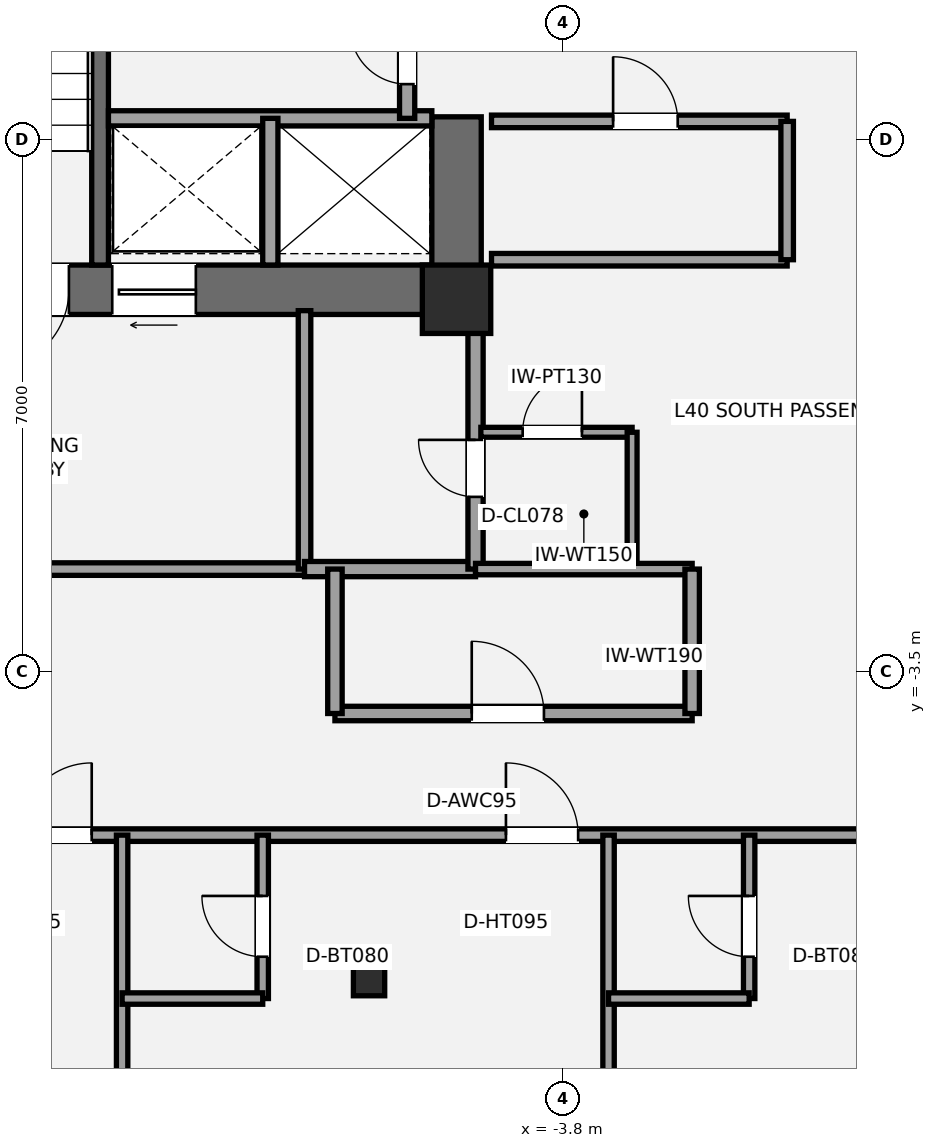
"""IFC4 building model, lengths in metres.
Left out: names, types, materials, properties, quantities, classifications, styles, units other than length and angle.
Written with IfcOpenShell. Run it as: python <this file> out.ifc"""

import sys

from ifc_helpers import new_model, si_unit, direction, frame, frame_2d, origin, origin_2d, place, context, subcontext, project, spatial, rectangle, i_section, extrude, element, fill, save


model = new_model("IFC4")
c1 = context("Model", 3, precision=1e-05, world=origin(), true_north=direction((0.0, 1.0)))
c2 = subcontext(c1, "Body", "Model", "MODEL_VIEW")
j1 = project(units=[si_unit("LENGTHUNIT", "METRE"), si_unit("PLANEANGLEUNIT", "RADIAN")], contexts=[c1])
p1 = place(None, origin())
s1 = spatial("IfcSite", under=j1, at=p1, CompositionType="ELEMENT")
p2 = place(p1, origin())
s2 = spatial("IfcBuilding", under=s1, at=p2, CompositionType="ELEMENT")
p3 = place(p2, frame((0.0, 0.0, 150.2)))
s3 = spatial("IfcBuildingStorey", under=s2, at=p3, CompositionType="ELEMENT", Elevation=150.2)
p4 = place(p3, frame((-4.875, 1.525, 0.0), z_axis=(0.0, 0.0, 1.0), x_axis=(-1.0, 0.0, 0.0)))
e1 = element("IfcWall", 1, at=p4, inside=s3, PredefinedType="SHEAR", context=c2, shape_type="SweptSolid", body=[
    extrude(rectangle(XDim=8.925, YDim=0.65, at=frame_2d((4.462, 0.0))), origin(), (0.0, 0.0, 1.0), 3.2),
])
p5 = place(p4, frame((5.425, 0.0, 0.0)))
e2 = element("IfcOpeningElement", 2, at=p5, cuts=e1, PredefinedType="OPENING", context=c2, shape_type="SweptSolid", body=[
    extrude(rectangle(XDim=1.05, YDim=2.15, at=frame_2d((0.525, 1.075))), frame((0.0, 0.335, 0.0), z_axis=(0.0, -1.0, 0.0), x_axis=(1.0, 0.0, 0.0)), (0.0, 0.0, 1.0), 0.67),
])
p6 = place(p4, frame((3.755, 0.0, 0.0)))
e3 = element("IfcOpeningElement", 3, at=p6, cuts=e1, PredefinedType="OPENING", context=c2, shape_type="SweptSolid", body=[
    extrude(rectangle(XDim=1.1, YDim=2.2, at=frame_2d((0.55, 1.1))), frame((0.0, 0.335, 0.0), z_axis=(0.0, -1.0, 0.0), x_axis=(1.0, 0.0, 0.0)), (0.0, 0.0, 1.0), 0.67),
])
p7 = place(p3, frame((-5.2, 1.2, 0.0), z_axis=(0.0, 0.0, 1.0), x_axis=(0.0, 1.0, 0.0)))
e4 = element("IfcWall", 4, at=p7, inside=s3, PredefinedType="SHEAR", context=c2, shape_type="SweptSolid", body=[
    extrude(rectangle(XDim=2.6, YDim=0.65, at=frame_2d((1.3, 0.0))), origin(), (0.0, 0.0, 1.0), 3.2),
])
p8 = place(p3, frame((-9.89, 1.85, 0.0), z_axis=(0.0, 0.0, 1.0), x_axis=(0.0, 1.0, 0.0)))
e5 = element("IfcWall", 5, at=p8, inside=s3, PredefinedType="SHEAR", context=c2, shape_type="SweptSolid", body=[
    extrude(rectangle(XDim=7.15, YDim=0.22, at=frame_2d((3.575, 0.0))), origin(), (0.0, 0.0, 1.0), 3.2),
])
p9 = place(p3, frame((-5.2, 1.4, 0.0), z_axis=(0.0, 0.0, 1.0), x_axis=(1.0, 0.0, 0.0)))
e6 = element("IfcColumn", 6, at=p9, inside=s3, PredefinedType="COLUMN", context=c2, shape_type="SweptSolid", body=[
    extrude(rectangle(XDim=0.9, YDim=0.9, at=origin_2d()), origin(), (0.0, 0.0, 1.0), 3.2),
])
p10 = place(p3, frame((-6.351, -7.546, 0.0), z_axis=(0.0, 0.0, 1.0), x_axis=(1.0, 0.0, 0.0)))
e7 = element("IfcColumn", 7, at=p10, inside=s3, PredefinedType="COLUMN", context=c2, shape_type="SweptSolid", body=[
    extrude(i_section(OverallWidth=0.412, OverallDepth=0.435, WebThickness=0.036, FlangeThickness=0.057, at=origin_2d()), origin(), (0.0, 0.0, 1.0), 3.2),
])
p11 = place(p3, frame((-13.45, -2.15, 0.0), z_axis=(0.0, 0.0, 1.0), x_axis=(1.0, 0.0, 0.0)))
e8 = element("IfcWall", 8, at=p11, inside=s3, PredefinedType="PARTITIONING", context=c2, shape_type="SweptSolid", body=[
    extrude(rectangle(XDim=6.25, YDim=0.165, at=frame_2d((3.125, 0.0))), origin(), (0.0, 0.0, 1.0), 2.473),
])
p12 = place(p3, frame((-7.2, -2.15, 0.0), z_axis=(0.0, 0.0, 1.0), x_axis=(0.0, 1.0, 0.0)))
e9 = element("IfcWall", 9, at=p12, inside=s3, PredefinedType="PARTITIONING", context=c2, shape_type="SweptSolid", body=[
    extrude(rectangle(XDim=3.4, YDim=0.165, at=frame_2d((1.7, 0.0))), origin(), (0.0, 0.0, 1.0), 2.473),
])
p13 = place(p3, frame((-7.2, -2.15, 0.0), z_axis=(0.0, 0.0, 1.0), x_axis=(1.0, 0.0, 0.0)))
e10 = element("IfcWall", 10, at=p13, inside=s3, PredefinedType="SOLIDWALL", context=c2, shape_type="SweptSolid", body=[
    extrude(rectangle(XDim=2.25, YDim=0.2, at=frame_2d((1.125, 0.0))), origin(), (0.0, 0.0, 1.0), 3.02),
])
p14 = place(p3, frame((-4.95, -2.15, 0.0), z_axis=(0.0, 0.0, 1.0), x_axis=(0.0, 1.0, 0.0)))
e11 = element("IfcWall", 11, at=p14, inside=s3, PredefinedType="SOLIDWALL", context=c2, shape_type="SweptSolid", body=[
    extrude(rectangle(XDim=3.4, YDim=0.2, at=frame_2d((1.7, 0.0))), origin(), (0.0, 0.0, 1.0), 2.473),
])
p15 = place(p14, frame((0.95, 0.0, 0.0)))
e12 = element("IfcOpeningElement", 12, at=p15, cuts=e11, PredefinedType="OPENING", context=c2, shape_type="SweptSolid", body=[
    extrude(rectangle(XDim=0.75, YDim=2.1, at=frame_2d((0.375, 1.05))), frame((0.0, 0.11, 0.0), z_axis=(0.0, -1.0, 0.0), x_axis=(1.0, 0.0, 0.0)), (0.0, 0.0, 1.0), 0.22),
])
p16 = place(p3, frame((-4.88, -0.35, 0.0), z_axis=(0.0, 0.0, 1.0), x_axis=(1.0, 0.0, 0.0)))
e13 = element("IfcWall", 13, at=p16, inside=s3, PredefinedType="PARTITIONING", context=c2, shape_type="SweptSolid", body=[
    extrude(rectangle(XDim=1.99, YDim=0.13, at=frame_2d((0.995, 0.0))), origin(), (0.0, 0.0, 1.0), 3.02),
])
p17 = place(p16, frame((0.55, 0.0, 0.0)))
e14 = element("IfcOpeningElement", 14, at=p17, cuts=e13, PredefinedType="OPENING", context=c2, shape_type="SweptSolid", body=[
    extrude(rectangle(XDim=0.78, YDim=2.1, at=frame_2d((0.39, 1.05))), frame((0.0, 0.075, 0.0), z_axis=(0.0, -1.0, 0.0), x_axis=(1.0, 0.0, 0.0)), (0.0, 0.0, 1.0), 0.15),
])
p18 = place(p3, frame((-2.89, -2.15, 0.0), z_axis=(0.0, 0.0, 1.0), x_axis=(0.0, 1.0, 0.0)))
e15 = element("IfcWall", 15, at=p18, inside=s3, PredefinedType="PARTITIONING", context=c2, shape_type="SweptSolid", body=[
    extrude(rectangle(XDim=1.8, YDim=0.13, at=frame_2d((0.9, 0.0))), origin(), (0.0, 0.0, 1.0), 3.02),
])
p19 = place(p3, frame((-9.78, 3.78, 0.0), z_axis=(0.0, 0.0, 1.0), x_axis=(1.0, 0.0, 0.0)))
e16 = element("IfcWall", 16, at=p19, inside=s3, PredefinedType="SOLIDWALL", context=c2, shape_type="SweptSolid", body=[
    extrude(rectangle(XDim=4.255, YDim=0.2, at=frame_2d((2.127, 0.0))), origin(), (0.0, 0.0, 1.0), 3.02),
])
p20 = place(p3, frame((-7.65, 1.85, 0.0), z_axis=(0.0, 0.0, 1.0), x_axis=(0.0, 1.0, 0.0)))
e17 = element("IfcWall", 17, at=p20, inside=s3, PredefinedType="SOLIDWALL", context=c2, shape_type="SweptSolid", body=[
    extrude(rectangle(XDim=1.93, YDim=0.2, at=frame_2d((0.965, 0.0))), origin(), (0.0, 0.0, 1.0), 3.02),
])
p21 = place(p3, frame((-5.85, 3.78, 0.0), z_axis=(0.0, 0.0, 1.0), x_axis=(0.0, 1.0, 0.0)))
e18 = element("IfcWall", 18, at=p21, inside=s3, PredefinedType="SOLIDWALL", context=c2, shape_type="SweptSolid", body=[
    extrude(rectangle(XDim=1.69, YDim=0.2, at=frame_2d((0.845, 0.0))), origin(), (0.0, 0.0, 1.0), 3.02),
])
p22 = place(p21, frame((0.45, 0.0, 0.0)))
e19 = element("IfcOpeningElement", 19, at=p22, cuts=e18, PredefinedType="OPENING", context=c2, shape_type="SweptSolid", body=[
    extrude(rectangle(XDim=0.75, YDim=2.1, at=frame_2d((0.375, 1.05))), frame((0.0, 0.11, 0.0), z_axis=(0.0, -1.0, 0.0), x_axis=(1.0, 0.0, 0.0)), (0.0, 0.0, 1.0), 0.22),
])
p23 = place(p3, frame((-4.74, 1.92, 0.0), z_axis=(0.0, 0.0, 1.0), x_axis=(1.0, 0.0, 0.0)))
e20 = element("IfcWall", 20, at=p23, inside=s3, PredefinedType="PARTITIONING", context=c2, shape_type="SweptSolid", body=[
    extrude(rectangle(XDim=3.89, YDim=0.165, at=frame_2d((1.945, 0.0))), origin(), (0.0, 0.0, 1.0), 2.16),
])
p24 = place(p3, frame((-4.74, 3.74, 0.0), z_axis=(0.0, 0.0, 1.0), x_axis=(1.0, 0.0, 0.0)))
e21 = element("IfcWall", 21, at=p24, inside=s3, PredefinedType="PARTITIONING", context=c2, shape_type="SweptSolid", body=[
    extrude(rectangle(XDim=3.89, YDim=0.165, at=frame_2d((1.945, 0.0))), origin(), (0.0, 0.0, 1.0), 3.02),
])
p25 = place(p24, frame((1.6, 0.0, 0.0)))
e22 = element("IfcOpeningElement", 22, at=p25, cuts=e21, PredefinedType="OPENING", context=c2, shape_type="SweptSolid", body=[
    extrude(rectangle(XDim=0.85, YDim=2.1, at=frame_2d((0.425, 1.05))), frame((0.0, 0.093, 0.0), z_axis=(0.0, -1.0, 0.0), x_axis=(1.0, 0.0, 0.0)), (0.0, 0.0, 1.0), 0.185),
])
p26 = place(p3, frame((-0.85, 1.92, 0.0), z_axis=(0.0, 0.0, 1.0), x_axis=(0.0, 1.0, 0.0)))
e23 = element("IfcWall", 23, at=p26, inside=s3, PredefinedType="PARTITIONING", context=c2, shape_type="SweptSolid", body=[
    extrude(rectangle(XDim=1.82, YDim=0.165, at=frame_2d((0.91, 0.0))), origin(), (0.0, 0.0, 1.0), 3.02),
])
p27 = place(p3, frame((-6.8, -4.05, 0.0), z_axis=(0.0, 0.0, 1.0), x_axis=(1.0, 0.0, 0.0)))
e24 = element("IfcWall", 24, at=p27, inside=s3, PredefinedType="PLUMBINGWALL", context=c2, shape_type="SweptSolid", body=[
    extrude(rectangle(XDim=4.7, YDim=0.19, at=frame_2d((2.35, 0.0))), origin(), (0.0, 0.0, 1.0), 2.555),
])
p28 = place(p27, frame((1.8, 0.0, 0.0)))
e25 = element("IfcOpeningElement", 25, at=p28, cuts=e24, PredefinedType="OPENING", context=c2, shape_type="SweptSolid", body=[
    extrude(rectangle(XDim=0.95, YDim=2.15, at=frame_2d((0.475, 1.075))), frame((0.0, 0.105, 0.0), z_axis=(0.0, -1.0, 0.0), x_axis=(1.0, 0.0, 0.0)), (0.0, 0.0, 1.0), 0.21),
])
p29 = place(p3, frame((-4.95, -2.15, 0.0), z_axis=(0.0, 0.0, 1.0), x_axis=(1.0, 0.0, 0.0)))
e26 = element("IfcWall", 26, at=p29, inside=s3, PredefinedType="PLUMBINGWALL", context=c2, shape_type="SweptSolid", body=[
    extrude(rectangle(XDim=2.85, YDim=0.15, at=frame_2d((1.425, 0.0))), origin(), (0.0, 0.0, 1.0), 2.473),
])
for number, where, z_axis, x_axis in (
    (27, (-6.8, -4.05, 0.0), (0.0, 0.0, 1.0), (0.0, 1.0, 0.0)),
    (28, (-2.1, -4.05, 0.0), (0.0, 0.0, 1.0), (0.0, 1.0, 0.0)),
):
    element("IfcWall", number, at=place(p3, frame(where, z_axis=z_axis, x_axis=x_axis)), inside=s3, PredefinedType="PLUMBINGWALL", context=c2, shape_type="SweptSolid", body=[
        extrude(rectangle(XDim=1.9, YDim=0.19, at=frame_2d((0.95, 0.0))), origin(), (0.0, 0.0, 1.0), 3.02),
    ])
p30 = place(p3, frame((-15.55, -5.65, 0.0), z_axis=(0.0, 0.0, 1.0), x_axis=(1.0, 0.0, 0.0)))
e29 = element("IfcWall", 29, at=p30, inside=s3, PredefinedType="PARTITIONING", context=c2, shape_type="SweptSolid", body=[
    extrude(rectangle(XDim=31.1, YDim=0.165, at=frame_2d((15.55, 0.0))), origin(), (0.0, 0.0, 1.0), 2.398),
])
p31 = place(p30, frame((4.6, 0.0, 0.0)))
e30 = element("IfcOpeningElement", 30, at=p31, cuts=e29, PredefinedType="OPENING", context=c2, shape_type="SweptSolid", body=[
    extrude(rectangle(XDim=0.95, YDim=2.15, at=frame_2d((0.475, 1.075))), frame((0.0, 0.093, 0.0), z_axis=(0.0, -1.0, 0.0), x_axis=(1.0, 0.0, 0.0)), (0.0, 0.0, 1.0), 0.185),
])
p32 = place(p30, frame((11.0, 0.0, 0.0)))
e31 = element("IfcOpeningElement", 31, at=p32, cuts=e29, PredefinedType="OPENING", context=c2, shape_type="SweptSolid", body=[
    extrude(rectangle(XDim=0.95, YDim=2.15, at=frame_2d((0.475, 1.075))), frame((0.0, 0.093, 0.0), z_axis=(0.0, -1.0, 0.0), x_axis=(1.0, 0.0, 0.0)), (0.0, 0.0, 1.0), 0.185),
])
p33 = place(p30, frame((17.4, 0.0, 0.0)))
e32 = element("IfcOpeningElement", 32, at=p33, cuts=e29, PredefinedType="OPENING", context=c2, shape_type="SweptSolid", body=[
    extrude(rectangle(XDim=0.95, YDim=2.15, at=frame_2d((0.475, 1.075))), frame((0.0, 0.093, 0.0), z_axis=(0.0, -1.0, 0.0), x_axis=(1.0, 0.0, 0.0)), (0.0, 0.0, 1.0), 0.185),
])
p34 = place(p30, frame((23.8, 0.0, 0.0)))
e33 = element("IfcOpeningElement", 33, at=p34, cuts=e29, PredefinedType="OPENING", context=c2, shape_type="SweptSolid", body=[
    extrude(rectangle(XDim=0.95, YDim=2.15, at=frame_2d((0.475, 1.075))), frame((0.0, 0.093, 0.0), z_axis=(0.0, -1.0, 0.0), x_axis=(1.0, 0.0, 0.0)), (0.0, 0.0, 1.0), 0.185),
])
p35 = place(p30, frame((29.75, 0.0, 0.0)))
e34 = element("IfcOpeningElement", 34, at=p35, cuts=e29, PredefinedType="OPENING", context=c2, shape_type="SweptSolid", body=[
    extrude(rectangle(XDim=0.95, YDim=2.15, at=frame_2d((0.475, 1.075))), frame((0.0, 0.093, 0.0), z_axis=(0.0, -1.0, 0.0), x_axis=(1.0, 0.0, 0.0)), (0.0, 0.0, 1.0), 0.185),
])
p36 = place(p3, frame((-9.6, -15.423, 0.0), z_axis=(0.0, 0.0, 1.0), x_axis=(0.0, 1.0, 0.0)))
e35 = element("IfcWall", 35, at=p36, inside=s3, PredefinedType="PLUMBINGWALL", context=c2, shape_type="SweptSolid", body=[
    extrude(rectangle(XDim=9.773, YDim=0.15, at=frame_2d((4.886, 0.0))), origin(), (0.0, 0.0, 1.0), 2.473),
])
p37 = place(p3, frame((-3.2, -16.217, 0.0), z_axis=(0.0, 0.0, 1.0), x_axis=(0.0, 1.0, 0.0)))
e36 = element("IfcWall", 36, at=p37, inside=s3, PredefinedType="PLUMBINGWALL", context=c2, shape_type="SweptSolid", body=[
    extrude(rectangle(XDim=10.567, YDim=0.15, at=frame_2d((5.283, 0.0))), origin(), (0.0, 0.0, 1.0), 3.02),
])
p38 = place(p3, frame((-7.75, -7.8, 0.0), z_axis=(0.0, 0.0, 1.0), x_axis=(0.0, 1.0, 0.0)))
e37 = element("IfcWall", 37, at=p38, inside=s3, PredefinedType="PLUMBINGWALL", context=c2, shape_type="SweptSolid", body=[
    extrude(rectangle(XDim=2.15, YDim=0.15, at=frame_2d((1.075, 0.0))), origin(), (0.0, 0.0, 1.0), 2.473),
])
p39 = place(p38, frame((0.55, 0.0, 0.0)))
e38 = element("IfcOpeningElement", 38, at=p39, cuts=e37, PredefinedType="OPENING", context=c2, shape_type="SweptSolid", body=[
    extrude(rectangle(XDim=0.8, YDim=2.1, at=frame_2d((0.4, 1.05))), frame((0.0, 0.085, 0.0), z_axis=(0.0, -1.0, 0.0), x_axis=(1.0, 0.0, 0.0)), (0.0, 0.0, 1.0), 0.17),
])
p40 = place(p3, frame((-9.6, -7.8, 0.0), z_axis=(0.0, 0.0, 1.0), x_axis=(1.0, 0.0, 0.0)))
e39 = element("IfcWall", 39, at=p40, inside=s3, PredefinedType="PLUMBINGWALL", context=c2, shape_type="SweptSolid", body=[
    extrude(rectangle(XDim=1.85, YDim=0.15, at=frame_2d((0.925, 0.0))), origin(), (0.0, 0.0, 1.0), 3.02),
])
p41 = place(p3, frame((-1.35, -7.8, 0.0), z_axis=(0.0, 0.0, 1.0), x_axis=(0.0, 1.0, 0.0)))
e40 = element("IfcWall", 40, at=p41, inside=s3, PredefinedType="PLUMBINGWALL", context=c2, shape_type="SweptSolid", body=[
    extrude(rectangle(XDim=2.15, YDim=0.15, at=frame_2d((1.075, 0.0))), origin(), (0.0, 0.0, 1.0), 2.473),
])
p42 = place(p41, frame((0.55, 0.0, 0.0)))
e41 = element("IfcOpeningElement", 41, at=p42, cuts=e40, PredefinedType="OPENING", context=c2, shape_type="SweptSolid", body=[
    extrude(rectangle(XDim=0.8, YDim=2.1, at=frame_2d((0.4, 1.05))), frame((0.0, 0.085, 0.0), z_axis=(0.0, -1.0, 0.0), x_axis=(1.0, 0.0, 0.0)), (0.0, 0.0, 1.0), 0.17),
])
p43 = place(p3, frame((-3.2, -7.8, 0.0), z_axis=(0.0, 0.0, 1.0), x_axis=(1.0, 0.0, 0.0)))
e42 = element("IfcWall", 42, at=p43, inside=s3, PredefinedType="PLUMBINGWALL", context=c2, shape_type="SweptSolid", body=[
    extrude(rectangle(XDim=1.85, YDim=0.15, at=frame_2d((0.925, 0.0))), origin(), (0.0, 0.0, 1.0), 3.02),
])
p44 = place(p5, origin())
e43 = element("IfcDoor", 43, at=p44, inside=s3, OperationType="SINGLE_SWING_RIGHT", PredefinedType="DOOR", context=c2, shape_type="SweptSolid", body=[
    extrude(rectangle(XDim=1.05, YDim=2.15, at=frame_2d((0.525, 1.075))), frame((0.0, 0.025, 0.0), z_axis=(0.0, -1.0, 0.0), x_axis=(1.0, 0.0, 0.0)), (0.0, 0.0, 1.0), 0.05),
])
fill(e2, e43)
p45 = place(p15, origin())
e44 = element("IfcDoor", 44, at=p45, inside=s3, OperationType="SINGLE_SWING_RIGHT", PredefinedType="DOOR", context=c2, shape_type="SweptSolid", body=[
    extrude(rectangle(XDim=0.75, YDim=2.1, at=frame_2d((0.375, 1.05))), frame((0.0, 0.025, 0.0), z_axis=(0.0, -1.0, 0.0), x_axis=(1.0, 0.0, 0.0)), (0.0, 0.0, 1.0), 0.05),
])
fill(e12, e44)
p46 = place(p17, origin())
e45 = element("IfcDoor", 45, at=p46, inside=s3, OperationType="SINGLE_SWING_RIGHT", PredefinedType="DOOR", context=c2, shape_type="SweptSolid", body=[
    extrude(rectangle(XDim=0.78, YDim=2.1, at=frame_2d((0.39, 1.05))), frame((0.0, 0.025, 0.0), z_axis=(0.0, -1.0, 0.0), x_axis=(1.0, 0.0, 0.0)), (0.0, 0.0, 1.0), 0.05),
])
fill(e14, e45)
p47 = place(p6, origin())
e46 = element("IfcDoor", 46, at=p47, inside=s3, OperationType="SLIDING_TO_LEFT", PredefinedType="DOOR", context=c2, shape_type="SweptSolid", body=[
    extrude(rectangle(XDim=1.1, YDim=2.2, at=frame_2d((0.55, 1.1))), frame((0.0, 0.025, 0.0), z_axis=(0.0, -1.0, 0.0), x_axis=(1.0, 0.0, 0.0)), (0.0, 0.0, 1.0), 0.05),
])
fill(e3, e46)
p48 = place(p22, origin())
e47 = element("IfcDoor", 47, at=p48, inside=s3, OperationType="SINGLE_SWING_RIGHT", PredefinedType="DOOR", context=c2, shape_type="SweptSolid", body=[
    extrude(rectangle(XDim=0.75, YDim=2.1, at=frame_2d((0.375, 1.05))), frame((0.0, 0.025, 0.0), z_axis=(0.0, -1.0, 0.0), x_axis=(1.0, 0.0, 0.0)), (0.0, 0.0, 1.0), 0.05),
])
fill(e19, e47)
p49 = place(p25, origin())
e48 = element("IfcDoor", 48, at=p49, inside=s3, OperationType="SINGLE_SWING_LEFT", PredefinedType="DOOR", context=c2, shape_type="SweptSolid", body=[
    extrude(rectangle(XDim=0.85, YDim=2.1, at=frame_2d((0.425, 1.05))), frame((0.0, 0.025, 0.0), z_axis=(0.0, -1.0, 0.0), x_axis=(1.0, 0.0, 0.0)), (0.0, 0.0, 1.0), 0.05),
])
fill(e22, e48)
p50 = place(p28, origin())
e49 = element("IfcDoor", 49, at=p50, inside=s3, OperationType="SINGLE_SWING_LEFT", PredefinedType="DOOR", context=c2, shape_type="SweptSolid", body=[
    extrude(rectangle(XDim=0.95, YDim=2.15, at=frame_2d((0.475, 1.075))), frame((0.0, 0.025, 0.0), z_axis=(0.0, -1.0, 0.0), x_axis=(1.0, 0.0, 0.0)), (0.0, 0.0, 1.0), 0.05),
])
fill(e25, e49)
p51 = place(p31, origin())
e50 = element("IfcDoor", 50, at=p51, inside=s3, OperationType="SINGLE_SWING_RIGHT", PredefinedType="DOOR", context=c2, shape_type="SweptSolid", body=[
    extrude(rectangle(XDim=0.95, YDim=2.15, at=frame_2d((0.475, 1.075))), frame((0.0, 0.025, 0.0), z_axis=(0.0, -1.0, 0.0), x_axis=(1.0, 0.0, 0.0)), (0.0, 0.0, 1.0), 0.05),
])
fill(e30, e50)
p52 = place(p32, origin())
e51 = element("IfcDoor", 51, at=p52, inside=s3, OperationType="SINGLE_SWING_LEFT", PredefinedType="DOOR", context=c2, shape_type="SweptSolid", body=[
    extrude(rectangle(XDim=0.95, YDim=2.15, at=frame_2d((0.475, 1.075))), frame((0.0, 0.025, 0.0), z_axis=(0.0, -1.0, 0.0), x_axis=(1.0, 0.0, 0.0)), (0.0, 0.0, 1.0), 0.05),
])
fill(e31, e51)
p53 = place(p39, origin())
e52 = element("IfcDoor", 52, at=p53, inside=s3, OperationType="SINGLE_SWING_RIGHT", PredefinedType="DOOR", context=c2, shape_type="SweptSolid", body=[
    extrude(rectangle(XDim=0.8, YDim=2.1, at=frame_2d((0.4, 1.05))), frame((0.0, 0.025, 0.0), z_axis=(0.0, -1.0, 0.0), x_axis=(1.0, 0.0, 0.0)), (0.0, 0.0, 1.0), 0.05),
])
fill(e38, e52)
p54 = place(p42, origin())
e53 = element("IfcDoor", 53, at=p54, inside=s3, OperationType="SINGLE_SWING_RIGHT", PredefinedType="DOOR", context=c2, shape_type="SweptSolid", body=[
    extrude(rectangle(XDim=0.8, YDim=2.1, at=frame_2d((0.4, 1.05))), frame((0.0, 0.025, 0.0), z_axis=(0.0, -1.0, 0.0), x_axis=(1.0, 0.0, 0.0)), (0.0, 0.0, 1.0), 0.05),
])
fill(e41, e53)
save(model, sys.argv[1])
